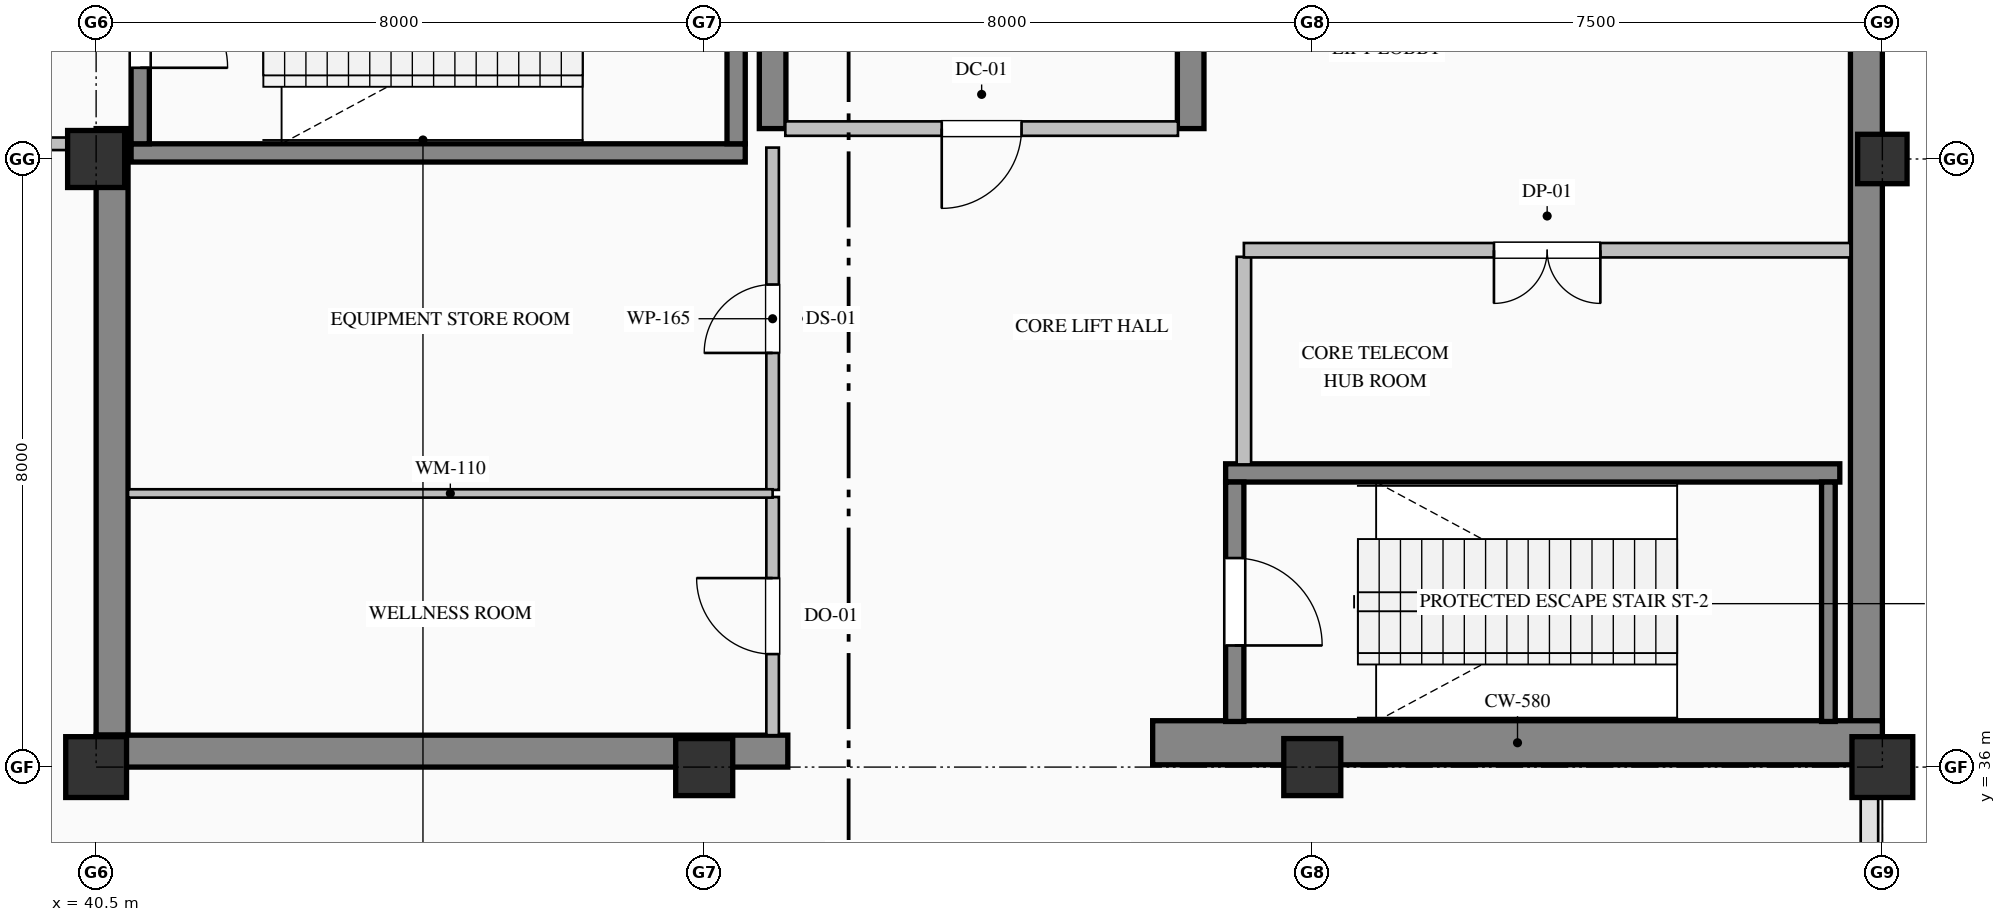
"""IFC4 building model, lengths in metres.
Left out: names, types, materials, properties, quantities, classifications, styles, units other than length and angle.
Written with IfcOpenShell. Run it as: python <this file> out.ifc"""

import sys

from ifc_helpers import new_model, si_unit, direction, frame, frame_2d, origin, origin_2d, place, context, subcontext, project, spatial, rectangle, hollow_rectangle, extrude, element, fill, save


model = new_model("IFC4")
c1 = context("Model", 3, precision=1e-05, world=origin(), true_north=direction((0.0, 1.0)))
c2 = subcontext(c1, "Body", "Model", "MODEL_VIEW")
j1 = project(units=[si_unit("LENGTHUNIT", "METRE"), si_unit("PLANEANGLEUNIT", "RADIAN")], contexts=[c1])
p1 = place(None, origin())
s1 = spatial("IfcSite", under=j1, at=p1, CompositionType="ELEMENT")
p2 = place(p1, origin())
s2 = spatial("IfcBuilding", under=s1, at=p2, CompositionType="ELEMENT")
p3 = place(p2, frame((0.0, 0.0, 367.2)))
s3 = spatial("IfcBuildingStorey", under=s2, at=p3, CompositionType="ELEMENT", Elevation=367.2)
p4 = place(p3, frame((63.79, 36.32, 0.0), z_axis=(0.0, 0.0, 1.0), x_axis=(0.0, 1.0, 0.0)))
e1 = element("IfcWall", 1, at=p4, inside=s3, PredefinedType="SHEAR", context=c2, shape_type="SweptSolid", body=[
    extrude(rectangle(XDim=15.26, YDim=0.42, at=frame_2d((7.63, 0.0))), origin(), (0.0, 0.0, 1.0), 5.39),
])
p5 = place(p3, frame((40.71, 36.42, 0.0), z_axis=(0.0, 0.0, 1.0), x_axis=(0.0, 1.0, 0.0)))
e2 = element("IfcWall", 2, at=p5, inside=s3, PredefinedType="SHEAR", context=c2, shape_type="SweptSolid", body=[
    extrude(rectangle(XDim=7.98, YDim=0.42, at=frame_2d((3.99, 0.0))), origin(), (0.0, 0.0, 1.0), 5.39),
])
p6 = place(p3, frame((40.5, 36.21, 0.0), z_axis=(0.0, 0.0, 1.0), x_axis=(1.0, 0.0, 0.0)))
e3 = element("IfcWall", 3, at=p6, inside=s3, PredefinedType="SHEAR", context=c2, shape_type="SweptSolid", body=[
    extrude(rectangle(XDim=9.1, YDim=0.42, at=frame_2d((4.55, 0.0))), origin(), (0.0, 0.0, 1.0), 5.39),
])
p7 = place(p3, frame((54.4, 36.32, 0.0), z_axis=(0.0, 0.0, 1.0), x_axis=(1.0, 0.0, 0.0)))
e4 = element("IfcWall", 4, at=p7, inside=s3, PredefinedType="SHEAR", context=c2, shape_type="SweptSolid", body=[
    extrude(rectangle(XDim=9.6, YDim=0.58, at=frame_2d((4.8, 0.0))), origin(), (0.0, 0.0, 1.0), 5.8),
])
p8 = place(p3, frame((49.4, 44.4, 0.0), z_axis=(0.0, 0.0, 1.0), x_axis=(0.0, 1.0, 0.0)))
e5 = element("IfcWall", 5, at=p8, inside=s3, PredefinedType="SHEAR", context=c2, shape_type="SweptSolid", body=[
    extrude(rectangle(XDim=3.0, YDim=0.35, at=frame_2d((1.5, 0.0))), origin(), (0.0, 0.0, 1.0), 5.39),
])
p9 = place(p3, frame((54.9, 44.4, 0.0), z_axis=(0.0, 0.0, 1.0), x_axis=(0.0, 1.0, 0.0)))
e6 = element("IfcWall", 6, at=p9, inside=s3, PredefinedType="SHEAR", context=c2, shape_type="SweptSolid", body=[
    extrude(rectangle(XDim=7.18, YDim=0.35, at=frame_2d((3.59, 0.0))), origin(), (0.0, 0.0, 1.0), 5.39),
])
p10 = place(p3, frame((40.5, 36.0, 0.0), z_axis=(0.0, 0.0, 1.0), x_axis=(1.0, 0.0, 0.0)))
e7 = element("IfcColumn", 7, at=p10, inside=s3, PredefinedType="COLUMN", context=c2, shape_type="SweptSolid", body=[
    extrude(hollow_rectangle(XDim=0.8, YDim=0.8, WallThickness=0.032, at=origin_2d()), origin(), (0.0, 0.0, 1.0), 5.8),
])
for number, where, z_axis, x_axis in (
    (8, (40.5, 44.0, 0.0), (0.0, 0.0, 1.0), (1.0, 0.0, 0.0)),
    (9, (48.5, 36.0, 0.0), (0.0, 0.0, 1.0), (1.0, 0.0, 0.0)),
    (10, (56.5, 36.0, 0.0), (0.0, 0.0, 1.0), (1.0, 0.0, 0.0)),
):
    element("IfcColumn", number, at=place(p3, frame(where, z_axis=z_axis, x_axis=x_axis)), inside=s3, PredefinedType="COLUMN", context=c2, shape_type="SweptSolid", body=[
        extrude(rectangle(XDim=0.75, YDim=0.75, at=origin_2d()), origin(), (0.0, 0.0, 1.0), 5.8),
    ])
p11 = place(p3, frame((64.0, 36.0, 0.0), z_axis=(0.0, 0.0, 1.0), x_axis=(1.0, 0.0, 0.0)))
e11 = element("IfcColumn", 11, at=p11, inside=s3, PredefinedType="COLUMN", context=c2, shape_type="SweptSolid", body=[
    extrude(hollow_rectangle(XDim=0.8, YDim=0.8, WallThickness=0.032, at=origin_2d()), origin(), (0.0, 0.0, 1.0), 5.8),
])
p12 = place(p3, frame((64.0, 44.0, 0.0), z_axis=(0.0, 0.0, 1.0), x_axis=(1.0, 0.0, 0.0)))
e12 = element("IfcColumn", 12, at=p12, inside=s3, PredefinedType="COLUMN", context=c2, shape_type="SweptSolid", body=[
    extrude(hollow_rectangle(XDim=0.65, YDim=0.65, WallThickness=0.028, at=origin_2d()), origin(), (0.0, 0.0, 1.0), 5.8),
])
p13 = place(p3, frame((49.04, 44.08, 0.0), z_axis=(0.0, 0.0, 1.0), x_axis=(-1.0, 0.0, 0.0)))
e13 = element("IfcWall", 13, at=p13, inside=s3, PredefinedType="SOLIDWALL", context=c2, shape_type="SweptSolid", body=[
    extrude(rectangle(XDim=8.08, YDim=0.24, at=frame_2d((4.04, 0.0))), origin(), (0.0, 0.0, 1.0), 5.8),
])
p14 = place(p3, frame((41.08, 47.35, 0.0), z_axis=(0.0, 0.0, 1.0), x_axis=(0.0, -1.0, 0.0)))
e14 = element("IfcWall", 14, at=p14, inside=s3, PredefinedType="SOLIDWALL", context=c2, shape_type="SweptSolid", body=[
    extrude(rectangle(XDim=3.15, YDim=0.24, at=frame_2d((1.575, 0.0))), origin(), (0.0, 0.0, 1.0), 5.8),
])
p15 = place(p14, frame((1.0, 0.0, 0.0)))
e15 = element("IfcOpeningElement", 15, at=p15, cuts=e14, PredefinedType="OPENING", context=c2, shape_type="SweptSolid", body=[
    extrude(rectangle(XDim=1.15, YDim=2.2, at=frame_2d((0.575, 1.1))), frame((0.0, 0.13, 0.0), z_axis=(0.0, -1.0, 0.0), x_axis=(1.0, 0.0, 0.0)), (0.0, 0.0, 1.0), 0.26),
])
p16 = place(p3, frame((48.92, 44.2, 0.0), z_axis=(0.0, 0.0, 1.0), x_axis=(0.0, 1.0, 0.0)))
e16 = element("IfcWall", 16, at=p16, inside=s3, PredefinedType="SOLIDWALL", context=c2, shape_type="SweptSolid", body=[
    extrude(rectangle(XDim=3.15, YDim=0.24, at=frame_2d((1.575, 0.0))), origin(), (0.0, 0.0, 1.0), 5.8),
])
p17 = place(p3, frame((55.36, 39.87, 0.0), z_axis=(0.0, 0.0, 1.0), x_axis=(1.0, 0.0, 0.0)))
e17 = element("IfcWall", 17, at=p17, inside=s3, PredefinedType="SOLIDWALL", context=c2, shape_type="SweptSolid", body=[
    extrude(rectangle(XDim=8.08, YDim=0.24, at=frame_2d((4.04, 0.0))), origin(), (0.0, 0.0, 1.0), 5.8),
])
p18 = place(p3, frame((55.48, 39.75, 0.0), z_axis=(0.0, 0.0, 1.0), x_axis=(0.0, -1.0, 0.0)))
e18 = element("IfcWall", 18, at=p18, inside=s3, PredefinedType="SOLIDWALL", context=c2, shape_type="SweptSolid", body=[
    extrude(rectangle(XDim=3.15, YDim=0.24, at=frame_2d((1.575, 0.0))), origin(), (0.0, 0.0, 1.0), 5.8),
])
p19 = place(p18, frame((1.0, 0.0, 0.0)))
e19 = element("IfcOpeningElement", 19, at=p19, cuts=e18, PredefinedType="OPENING", context=c2, shape_type="SweptSolid", body=[
    extrude(rectangle(XDim=1.15, YDim=2.2, at=frame_2d((0.575, 1.1))), frame((0.0, 0.13, 0.0), z_axis=(0.0, -1.0, 0.0), x_axis=(1.0, 0.0, 0.0)), (0.0, 0.0, 1.0), 0.26),
])
p20 = place(p3, frame((63.29, 36.6, 0.0), z_axis=(0.0, 0.0, 1.0), x_axis=(0.0, 1.0, 0.0)))
e20 = element("IfcWall", 20, at=p20, inside=s3, PredefinedType="SOLIDWALL", context=c2, shape_type="SweptSolid", body=[
    extrude(rectangle(XDim=3.15, YDim=0.18, at=frame_2d((1.575, 0.0))), origin(), (0.0, 0.0, 1.0), 5.8),
])
p21 = place(p3, frame((40.5, 44.2, 0.0), z_axis=(0.0, 0.0, 1.0), x_axis=(-1.0, 0.0, 0.0)))
e21 = element("IfcWall", 21, at=p21, inside=s3, PredefinedType="PARTITIONING", context=c2, shape_type="SweptSolid", body=[
    extrude(rectangle(XDim=2.3, YDim=0.165, at=frame_2d((1.15, 0.0))), origin(), (0.0, 0.0, 1.0), 5.39),
])
p22 = place(p21, frame((0.625, 0.0, 0.0)))
e22 = element("IfcOpeningElement", 22, at=p22, cuts=e21, PredefinedType="OPENING", context=c2, shape_type="SweptSolid", body=[
    extrude(rectangle(XDim=1.05, YDim=2.15, at=frame_2d((0.525, 1.075))), frame((0.0, 0.093, 0.0), z_axis=(0.0, -1.0, 0.0), x_axis=(1.0, 0.0, 0.0)), (0.0, 0.0, 1.0), 0.185),
])
p23 = place(p3, frame((54.733, 44.4, 0.0), z_axis=(0.0, 0.0, 1.0), x_axis=(-1.0, 0.0, 0.0)))
e23 = element("IfcWall", 23, at=p23, inside=s3, PredefinedType="PARTITIONING", context=c2, shape_type="SweptSolid", body=[
    extrude(rectangle(XDim=5.166, YDim=0.19, at=frame_2d((2.583, 0.0))), origin(), (0.0, 0.0, 1.0), 5.39),
])
p24 = place(p23, frame((2.058, 0.0, 0.0)))
e24 = element("IfcOpeningElement", 24, at=p24, cuts=e23, PredefinedType="OPENING", context=c2, shape_type="SweptSolid", body=[
    extrude(rectangle(XDim=1.05, YDim=2.15, at=frame_2d((0.525, 1.075))), frame((0.0, 0.105, 0.0), z_axis=(0.0, -1.0, 0.0), x_axis=(1.0, 0.0, 0.0)), (0.0, 0.0, 1.0), 0.21),
])
p25 = place(p3, frame((49.4, 36.42, 0.0), z_axis=(0.0, 0.0, 1.0), x_axis=(0.0, 1.0, 0.0)))
e25 = element("IfcWall", 25, at=p25, inside=s3, PredefinedType="PARTITIONING", context=c2, shape_type="SweptSolid", body=[
    extrude(rectangle(XDim=3.133, YDim=0.165, at=frame_2d((1.566, 0.0))), origin(), (0.0, 0.0, 1.0), 4.632),
])
p26 = place(p25, frame((1.066, 0.0, 0.0)))
e26 = element("IfcOpeningElement", 26, at=p26, cuts=e25, PredefinedType="OPENING", context=c2, shape_type="SweptSolid", body=[
    extrude(rectangle(XDim=1.0, YDim=2.15, at=frame_2d((0.5, 1.075))), frame((0.0, 0.093, 0.0), z_axis=(0.0, -1.0, 0.0), x_axis=(1.0, 0.0, 0.0)), (0.0, 0.0, 1.0), 0.185),
])
p27 = place(p3, frame((49.4, 39.647, 0.0), z_axis=(0.0, 0.0, 1.0), x_axis=(0.0, 1.0, 0.0)))
e27 = element("IfcWall", 27, at=p27, inside=s3, PredefinedType="PARTITIONING", context=c2, shape_type="SweptSolid", body=[
    extrude(rectangle(XDim=4.503, YDim=0.165, at=frame_2d((2.251, 0.0))), origin(), (0.0, 0.0, 1.0), 4.632),
])
p28 = place(p27, frame((1.802, 0.0, 0.0)))
e28 = element("IfcOpeningElement", 28, at=p28, cuts=e27, PredefinedType="OPENING", context=c2, shape_type="SweptSolid", body=[
    extrude(rectangle(XDim=0.9, YDim=2.15, at=frame_2d((0.45, 1.075))), frame((0.0, 0.093, 0.0), z_axis=(0.0, -1.0, 0.0), x_axis=(1.0, 0.0, 0.0)), (0.0, 0.0, 1.0), 0.185),
])
p29 = place(p3, frame((55.6, 42.713, 0.0), z_axis=(0.0, 0.0, 1.0), x_axis=(0.0, -1.0, 0.0)))
e29 = element("IfcWall", 29, at=p29, inside=s3, PredefinedType="PARTITIONING", context=c2, shape_type="SweptSolid", body=[
    extrude(rectangle(XDim=2.731, YDim=0.19, at=frame_2d((1.365, 0.0))), origin(), (0.0, 0.0, 1.0), 5.39),
])
p30 = place(p3, frame((40.92, 39.6, 0.0), z_axis=(0.0, 0.0, 1.0), x_axis=(1.0, 0.0, 0.0)))
e30 = element("IfcWall", 30, at=p30, inside=s3, PredefinedType="MOVABLE", context=c2, shape_type="SweptSolid", body=[
    extrude(rectangle(XDim=8.48, YDim=0.11, at=frame_2d((4.24, 0.0))), origin(), (0.0, 0.0, 1.0), 5.39),
])
p31 = place(p3, frame((63.58, 42.8, 0.0), z_axis=(0.0, 0.0, 1.0), x_axis=(-1.0, 0.0, 0.0)))
e31 = element("IfcWall", 31, at=p31, inside=s3, PredefinedType="PARTITIONING", context=c2, shape_type="SweptSolid", body=[
    extrude(rectangle(XDim=7.98, YDim=0.19, at=frame_2d((3.99, 0.0))), origin(), (0.0, 0.0, 1.0), 5.39),
])
p32 = place(p31, frame((3.29, 0.0, 0.0)))
e32 = element("IfcOpeningElement", 32, at=p32, cuts=e31, PredefinedType="OPENING", context=c2, shape_type="SweptSolid", body=[
    extrude(rectangle(XDim=1.4, YDim=2.25, at=frame_2d((0.7, 1.125))), frame((0.0, 0.105, 0.0), z_axis=(0.0, -1.0, 0.0), x_axis=(1.0, 0.0, 0.0)), (0.0, 0.0, 1.0), 0.21),
])
p33 = place(p15, origin())
e33 = element("IfcDoor", 33, at=p33, inside=s3, OperationType="SINGLE_SWING_RIGHT", PredefinedType="DOOR", context=c2, shape_type="SweptSolid", body=[
    extrude(rectangle(XDim=1.15, YDim=2.2, at=frame_2d((0.575, 1.1))), frame((0.0, 0.025, 0.0), z_axis=(0.0, -1.0, 0.0), x_axis=(1.0, 0.0, 0.0)), (0.0, 0.0, 1.0), 0.05),
])
fill(e15, e33)
p34 = place(p19, origin())
e34 = element("IfcDoor", 34, at=p34, inside=s3, OperationType="SINGLE_SWING_RIGHT", PredefinedType="DOOR", context=c2, shape_type="SweptSolid", body=[
    extrude(rectangle(XDim=1.15, YDim=2.2, at=frame_2d((0.575, 1.1))), frame((0.0, 0.025, 0.0), z_axis=(0.0, -1.0, 0.0), x_axis=(1.0, 0.0, 0.0)), (0.0, 0.0, 1.0), 0.05),
])
fill(e19, e34)
p35 = place(p24, origin())
e35 = element("IfcDoor", 35, at=p35, inside=s3, OperationType="SINGLE_SWING_RIGHT", PredefinedType="DOOR", context=c2, shape_type="SweptSolid", body=[
    extrude(rectangle(XDim=1.05, YDim=2.15, at=frame_2d((0.525, 1.075))), frame((0.0, 0.025, 0.0), z_axis=(0.0, -1.0, 0.0), x_axis=(1.0, 0.0, 0.0)), (0.0, 0.0, 1.0), 0.05),
])
fill(e24, e35)
p36 = place(p26, origin())
e36 = element("IfcDoor", 36, at=p36, inside=s3, OperationType="SINGLE_SWING_RIGHT", PredefinedType="DOOR", context=c2, shape_type="SweptSolid", body=[
    extrude(rectangle(XDim=1.0, YDim=2.15, at=frame_2d((0.5, 1.075))), frame((0.0, 0.025, 0.0), z_axis=(0.0, -1.0, 0.0), x_axis=(1.0, 0.0, 0.0)), (0.0, 0.0, 1.0), 0.05),
])
fill(e26, e36)
p37 = place(p28, origin())
e37 = element("IfcDoor", 37, at=p37, inside=s3, OperationType="SINGLE_SWING_LEFT", PredefinedType="DOOR", context=c2, shape_type="SweptSolid", body=[
    extrude(rectangle(XDim=0.9, YDim=2.15, at=frame_2d((0.45, 1.075))), frame((0.0, 0.025, 0.0), z_axis=(0.0, -1.0, 0.0), x_axis=(1.0, 0.0, 0.0)), (0.0, 0.0, 1.0), 0.05),
])
fill(e28, e37)
p38 = place(p32, origin())
e38 = element("IfcDoor", 38, at=p38, inside=s3, OperationType="DOUBLE_DOOR_SINGLE_SWING", PredefinedType="DOOR", context=c2, shape_type="SweptSolid", body=[
    extrude(rectangle(XDim=1.4, YDim=2.25, at=frame_2d((0.7, 1.125))), frame((0.0, 0.025, 0.0), z_axis=(0.0, -1.0, 0.0), x_axis=(1.0, 0.0, 0.0)), (0.0, 0.0, 1.0), 0.05),
])
fill(e32, e38)
save(model, sys.argv[1])
